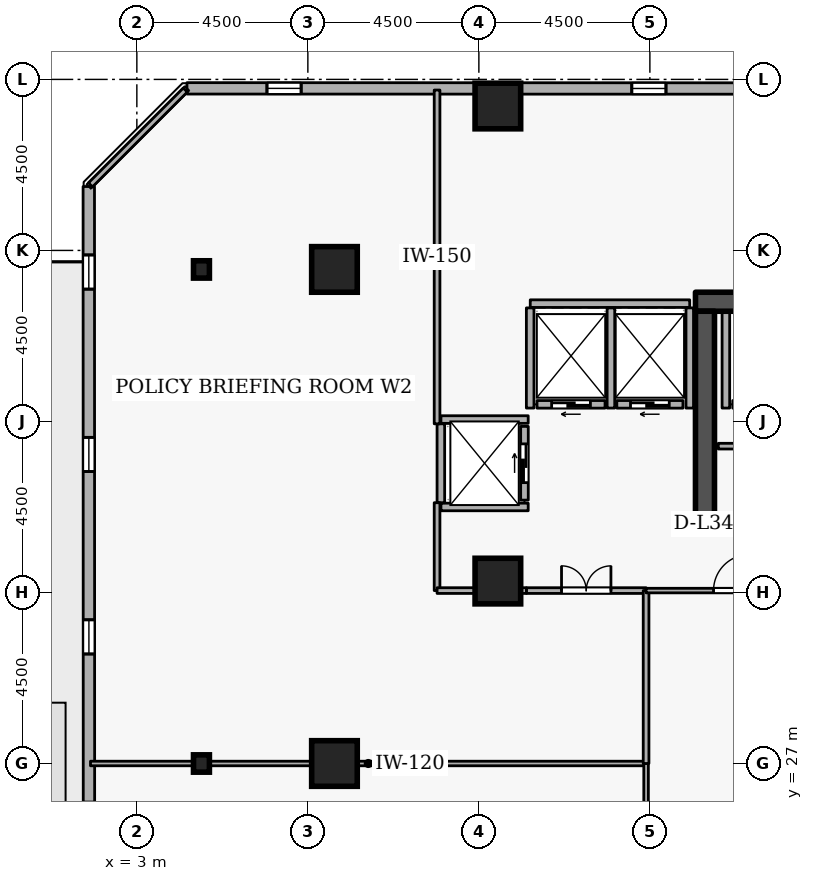
"""IFC4 building model, lengths in metres.
Left out: names, types, materials, properties, quantities, classifications, styles, units other than length and angle.
Written with IfcOpenShell. Run it as: python <this file> out.ifc"""

import sys

from ifc_helpers import new_model, si_unit, direction, frame, frame_2d, origin, origin_2d, place, context, subcontext, project, spatial, rectangle, i_section, extrude, element, fill, save


model = new_model("IFC4")
c1 = context("Model", 3, precision=1e-05, world=origin(), true_north=direction((0.0, 1.0)))
c2 = subcontext(c1, "Body", "Model", "MODEL_VIEW")
j1 = project(units=[si_unit("LENGTHUNIT", "METRE"), si_unit("PLANEANGLEUNIT", "RADIAN")], contexts=[c1])
p1 = place(None, origin())
s1 = spatial("IfcSite", under=j1, at=p1, CompositionType="ELEMENT")
p2 = place(p1, origin())
s2 = spatial("IfcBuilding", under=s1, at=p2, CompositionType="ELEMENT")
p3 = place(p2, frame((0.0, 0.0, 130.5)))
s3 = spatial("IfcBuildingStorey", under=s2, at=p3, CompositionType="ELEMENT", Elevation=130.5)
p4 = place(p3, frame((17.7, 39.15, 0.0), z_axis=(0.0, 0.0, 1.0), x_axis=(1.0, 0.0, 0.0)))
e1 = element("IfcWall", 1, at=p4, inside=s3, PredefinedType="SHEAR", context=c2, shape_type="SweptSolid", body=[
    extrude(rectangle(XDim=15.6, YDim=0.5, at=frame_2d((7.8, 0.0))), origin(), (0.0, 0.0, 1.0), 3.6),
])
p5 = place(p3, frame((17.95, 33.1, 0.0), z_axis=(0.0, 0.0, 1.0), x_axis=(0.0, 1.0, 0.0)))
e2 = element("IfcWall", 2, at=p5, inside=s3, PredefinedType="SHEAR", context=c2, shape_type="SweptSolid", body=[
    extrude(rectangle(XDim=5.8, YDim=0.5, at=frame_2d((2.9, 0.0))), origin(), (0.0, 0.0, 1.0), 3.6),
])
for number, where, z_axis, x_axis in (
    (3, (12.5, 44.3, 0.0), (0.0, 0.0, 1.0), (1.0, 0.0, 0.0)),
    (4, (8.2, 27.0, 0.0), (0.0, 0.0, 1.0), (1.0, 0.0, 0.0)),
    (5, (8.2, 40.0, 0.0), (0.0, 0.0, 1.0), (1.0, 0.0, 0.0)),
    (6, (12.5, 31.8, 0.0), (0.0, 0.0, 1.0), (1.0, 0.0, 0.0)),
):
    element("IfcColumn", number, at=place(p3, frame(where, z_axis=z_axis, x_axis=x_axis)), inside=s3, PredefinedType="COLUMN", context=c2, shape_type="SweptSolid", body=[
        extrude(rectangle(XDim=1.2, YDim=1.2, at=origin_2d()), origin(), (0.0, 0.0, 1.0), 3.6),
    ])
for number, where, z_axis, x_axis in (
    (7, (4.7, 27.0, 0.0), (0.0, 0.0, 1.0), (1.0, 0.0, 0.0)),
    (8, (4.7, 40.0, 0.0), (0.0, 0.0, 1.0), (1.0, 0.0, 0.0)),
):
    element("IfcColumn", number, at=place(p3, frame(where, z_axis=z_axis, x_axis=x_axis)), inside=s3, PredefinedType="COLUMN", context=c2, shape_type="SweptSolid", body=[
        extrude(i_section(OverallWidth=0.418, OverallDepth=0.456, WebThickness=0.042, FlangeThickness=0.067, FilletRadius=0.015, at=origin_2d()), origin(), (0.0, 0.0, 1.0), 3.6),
    ])
p6 = place(p3, frame((37.924, 44.756, 0.0), z_axis=(0.0, 0.0, 1.0), x_axis=(-0.999999963872, 0.000268805477, 0.0)))
e9 = element("IfcWall", 9, at=p6, inside=s3, PredefinedType="STANDARD", context=c2, shape_type="SweptSolid", body=[
    extrude(rectangle(XDim=33.605, YDim=0.3, at=frame_2d((16.802, 0.0))), origin(), (0.0, 0.0, 1.0), 2.7),
])
p7 = place(p6, frame((6.6, 0.0, 0.72)))
e10 = element("IfcOpeningElement", 10, at=p7, cuts=e9, PredefinedType="OPENING", context=c2, shape_type="SweptSolid", body=[
    extrude(rectangle(XDim=0.9, YDim=1.75, at=frame_2d((0.45, 0.875))), frame((0.0, 0.16, 0.0), z_axis=(0.0, -1.0, 0.0), x_axis=(1.0, 0.0, 0.0)), (0.0, 0.0, 1.0), 0.32),
])
p8 = place(p6, frame((16.2, 0.0, 0.72)))
e11 = element("IfcOpeningElement", 11, at=p8, cuts=e9, PredefinedType="OPENING", context=c2, shape_type="SweptSolid", body=[
    extrude(rectangle(XDim=0.9, YDim=1.75, at=frame_2d((0.45, 0.875))), frame((0.0, 0.16, 0.0), z_axis=(0.0, -1.0, 0.0), x_axis=(1.0, 0.0, 0.0)), (0.0, 0.0, 1.0), 0.32),
])
p9 = place(p6, frame((21.0, 0.0, 0.72)))
e12 = element("IfcOpeningElement", 12, at=p9, cuts=e9, PredefinedType="OPENING", context=c2, shape_type="SweptSolid", body=[
    extrude(rectangle(XDim=0.9, YDim=1.75, at=frame_2d((0.45, 0.875))), frame((0.0, 0.16, 0.0), z_axis=(0.0, -1.0, 0.0), x_axis=(1.0, 0.0, 0.0)), (0.0, 0.0, 1.0), 0.32),
])
p10 = place(p6, frame((30.6, 0.0, 0.72)))
e13 = element("IfcOpeningElement", 13, at=p10, cuts=e9, PredefinedType="OPENING", context=c2, shape_type="SweptSolid", body=[
    extrude(rectangle(XDim=0.9, YDim=1.75, at=frame_2d((0.45, 0.875))), frame((0.0, 0.16, 0.0), z_axis=(0.0, -1.0, 0.0), x_axis=(1.0, 0.0, 0.0)), (0.0, 0.0, 1.0), 0.32),
])
p11 = place(p3, frame((1.735, 42.181, 0.0), z_axis=(0.0, 0.0, 1.0), x_axis=(0.000268805477, -0.999999963872, 0.0)))
e14 = element("IfcWall", 14, at=p11, inside=s3, PredefinedType="STANDARD", context=c2, shape_type="SweptSolid", body=[
    extrude(rectangle(XDim=33.605, YDim=0.3, at=frame_2d((16.802, 0.0))), origin(), (0.0, 0.0, 1.0), 2.7),
])
p12 = place(p11, frame((18.603, 0.0, 0.0)))
e15 = element("IfcOpeningElement", 15, at=p12, cuts=e14, PredefinedType="OPENING", context=c2, shape_type="SweptSolid", body=[
    extrude(rectangle(XDim=1.0, YDim=2.08, at=frame_2d((0.5, 1.04))), frame((0.0, 0.16, 0.0), z_axis=(0.0, -1.0, 0.0), x_axis=(1.0, 0.0, 0.0)), (0.0, 0.0, 1.0), 0.32),
])
p13 = place(p11, frame((1.8, 0.0, 0.72)))
e16 = element("IfcOpeningElement", 16, at=p13, cuts=e14, PredefinedType="OPENING", context=c2, shape_type="SweptSolid", body=[
    extrude(rectangle(XDim=0.9, YDim=1.75, at=frame_2d((0.45, 0.875))), frame((0.0, 0.16, 0.0), z_axis=(0.0, -1.0, 0.0), x_axis=(1.0, 0.0, 0.0)), (0.0, 0.0, 1.0), 0.32),
])
p14 = place(p11, frame((6.6, 0.0, 0.72)))
e17 = element("IfcOpeningElement", 17, at=p14, cuts=e14, PredefinedType="OPENING", context=c2, shape_type="SweptSolid", body=[
    extrude(rectangle(XDim=0.9, YDim=1.75, at=frame_2d((0.45, 0.875))), frame((0.0, 0.16, 0.0), z_axis=(0.0, -1.0, 0.0), x_axis=(1.0, 0.0, 0.0)), (0.0, 0.0, 1.0), 0.32),
])
p15 = place(p11, frame((11.4, 0.0, 0.72)))
e18 = element("IfcOpeningElement", 18, at=p15, cuts=e14, PredefinedType="OPENING", context=c2, shape_type="SweptSolid", body=[
    extrude(rectangle(XDim=0.9, YDim=1.75, at=frame_2d((0.45, 0.875))), frame((0.0, 0.16, 0.0), z_axis=(0.0, -1.0, 0.0), x_axis=(1.0, 0.0, 0.0)), (0.0, 0.0, 1.0), 0.32),
])
p16 = place(p11, frame((16.2, 0.0, 0.72)))
e19 = element("IfcOpeningElement", 19, at=p16, cuts=e14, PredefinedType="OPENING", context=c2, shape_type="SweptSolid", body=[
    extrude(rectangle(XDim=0.9, YDim=1.75, at=frame_2d((0.45, 0.875))), frame((0.0, 0.16, 0.0), z_axis=(0.0, -1.0, 0.0), x_axis=(1.0, 0.0, 0.0)), (0.0, 0.0, 1.0), 0.32),
])
p17 = place(p11, frame((21.0, 0.0, 0.72)))
e20 = element("IfcOpeningElement", 20, at=p17, cuts=e14, PredefinedType="OPENING", context=c2, shape_type="SweptSolid", body=[
    extrude(rectangle(XDim=0.9, YDim=1.75, at=frame_2d((0.45, 0.875))), frame((0.0, 0.16, 0.0), z_axis=(0.0, -1.0, 0.0), x_axis=(1.0, 0.0, 0.0)), (0.0, 0.0, 1.0), 0.32),
])
p18 = place(p11, frame((25.8, 0.0, 0.72)))
e21 = element("IfcOpeningElement", 21, at=p18, cuts=e14, PredefinedType="OPENING", context=c2, shape_type="SweptSolid", body=[
    extrude(rectangle(XDim=0.9, YDim=1.75, at=frame_2d((0.45, 0.875))), frame((0.0, 0.16, 0.0), z_axis=(0.0, -1.0, 0.0), x_axis=(1.0, 0.0, 0.0)), (0.0, 0.0, 1.0), 0.32),
])
p19 = place(p11, frame((30.6, 0.0, 0.72)))
e22 = element("IfcOpeningElement", 22, at=p19, cuts=e14, PredefinedType="OPENING", context=c2, shape_type="SweptSolid", body=[
    extrude(rectangle(XDim=0.9, YDim=1.75, at=frame_2d((0.45, 0.875))), frame((0.0, 0.16, 0.0), z_axis=(0.0, -1.0, 0.0), x_axis=(1.0, 0.0, 0.0)), (0.0, 0.0, 1.0), 0.32),
])
p20 = place(p3, frame((20.62, 36.45, 0.0), z_axis=(0.0, 0.0, 1.0), x_axis=(-1.0, 0.0, 0.0)))
e23 = element("IfcWall", 23, at=p20, inside=s3, PredefinedType="STANDARD", context=c2, shape_type="SweptSolid", body=[
    extrude(rectangle(XDim=1.94, YDim=0.2, at=frame_2d((0.97, 0.0))), origin(), (0.0, 0.0, 1.0), 3.34),
])
p21 = place(p3, frame((17.37, 36.45, 0.0), z_axis=(0.0, 0.0, 1.0), x_axis=(-1.0, 0.0, 0.0)))
e24 = element("IfcWall", 24, at=p21, inside=s3, PredefinedType="STANDARD", context=c2, shape_type="SweptSolid", body=[
    extrude(rectangle(XDim=1.74, YDim=0.2, at=frame_2d((0.87, 0.0))), origin(), (0.0, 0.0, 1.0), 3.34),
])
p22 = place(p21, frame((0.36, 0.0, 0.0)))
e25 = element("IfcOpeningElement", 25, at=p22, cuts=e24, PredefinedType="OPENING", context=c2, shape_type="SweptSolid", body=[
    extrude(rectangle(XDim=1.02, YDim=2.06, at=frame_2d((0.51, 1.03))), frame((0.0, 0.11, 0.0), z_axis=(0.0, -1.0, 0.0), x_axis=(1.0, 0.0, 0.0)), (0.0, 0.0, 1.0), 0.22),
])
p23 = place(p3, frame((15.32, 36.45, 0.0), z_axis=(0.0, 0.0, 1.0), x_axis=(-1.0, 0.0, 0.0)))
e26 = element("IfcWall", 26, at=p23, inside=s3, PredefinedType="STANDARD", context=c2, shape_type="SweptSolid", body=[
    extrude(rectangle(XDim=1.79, YDim=0.2, at=frame_2d((0.895, 0.0))), origin(), (0.0, 0.0, 1.0), 3.34),
])
p24 = place(p23, frame((0.385, 0.0, 0.0)))
e27 = element("IfcOpeningElement", 27, at=p24, cuts=e26, PredefinedType="OPENING", context=c2, shape_type="SweptSolid", body=[
    extrude(rectangle(XDim=1.02, YDim=2.06, at=frame_2d((0.51, 1.03))), frame((0.0, 0.11, 0.0), z_axis=(0.0, -1.0, 0.0), x_axis=(1.0, 0.0, 0.0)), (0.0, 0.0, 1.0), 0.22),
])
p25 = place(p3, frame((13.2, 33.93, 0.0), z_axis=(0.0, 0.0, 1.0), x_axis=(0.0, 1.0, 0.0)))
e28 = element("IfcWall", 28, at=p25, inside=s3, PredefinedType="STANDARD", context=c2, shape_type="SweptSolid", body=[
    extrude(rectangle(XDim=1.94, YDim=0.2, at=frame_2d((0.97, 0.0))), origin(), (0.0, 0.0, 1.0), 3.34),
])
p26 = place(p25, frame((0.46, 0.0, 0.0)))
e29 = element("IfcOpeningElement", 29, at=p26, cuts=e28, PredefinedType="OPENING", context=c2, shape_type="SweptSolid", body=[
    extrude(rectangle(XDim=1.02, YDim=2.06, at=frame_2d((0.51, 1.03))), frame((0.0, 0.11, 0.0), z_axis=(0.0, -1.0, 0.0), x_axis=(1.0, 0.0, 0.0)), (0.0, 0.0, 1.0), 0.22),
])
p27 = place(p3, frame((18.5, 36.352, 0.0), z_axis=(0.0, 0.0, 1.0), x_axis=(0.0, 1.0, 0.0)))
e30 = element("IfcWall", 30, at=p27, inside=s3, PredefinedType="STANDARD", context=c2, shape_type="SweptSolid", body=[
    extrude(rectangle(XDim=2.536, YDim=0.2, at=frame_2d((1.268, 0.0))), origin(), (0.0, 0.0, 1.0), 3.34),
])
p28 = place(p3, frame((13.352, 39.1, 0.0), z_axis=(0.0, 0.0, 1.0), x_axis=(1.0, 0.0, 0.0)))
e31 = element("IfcWall", 31, at=p28, inside=s3, PredefinedType="STANDARD", context=c2, shape_type="SweptSolid", body=[
    extrude(rectangle(XDim=4.196, YDim=0.2, at=frame_2d((2.098, 0.0))), origin(), (0.0, 0.0, 1.0), 3.34),
])
p29 = place(p3, frame((17.55, 36.352, 0.0), z_axis=(0.0, 0.0, 1.0), x_axis=(0.0, 1.0, 0.0)))
e32 = element("IfcWall", 32, at=p29, inside=s3, PredefinedType="STANDARD", context=c2, shape_type="SweptSolid", body=[
    extrude(rectangle(XDim=2.636, YDim=0.2, at=frame_2d((1.318, 0.0))), origin(), (0.0, 0.0, 1.0), 2.545),
])
for number, where, z_axis, x_axis in (
    (33, (15.475, 36.352, 0.0), (0.0, 0.0, 1.0), (0.0, 1.0, 0.0)),
    (34, (13.35, 36.352, 0.0), (0.0, 0.0, 1.0), (0.0, 1.0, 0.0)),
):
    element("IfcWall", number, at=place(p3, frame(where, z_axis=z_axis, x_axis=x_axis)), inside=s3, PredefinedType="STANDARD", context=c2, shape_type="SweptSolid", body=[
        extrude(rectangle(XDim=2.636, YDim=0.2, at=frame_2d((1.318, 0.0))), origin(), (0.0, 0.0, 1.0), 3.34),
    ])
for number, where, z_axis, x_axis in (
    (35, (11.002, 36.05, 0.0), (0.0, 0.0, 1.0), (1.0, 0.0, 0.0)),
    (36, (11.002, 33.75, 0.0), (0.0, 0.0, 1.0), (1.0, 0.0, 0.0)),
):
    element("IfcWall", number, at=place(p3, frame(where, z_axis=z_axis, x_axis=x_axis)), inside=s3, PredefinedType="STANDARD", context=c2, shape_type="SweptSolid", body=[
        extrude(rectangle(XDim=2.296, YDim=0.2, at=frame_2d((1.148, 0.0))), origin(), (0.0, 0.0, 1.0), 3.34),
    ])
p30 = place(p3, frame((11.0, 33.862, 0.0), z_axis=(0.0, 0.0, 1.0), x_axis=(0.0, 1.0, 0.0)))
e37 = element("IfcWall", 37, at=p30, inside=s3, PredefinedType="STANDARD", context=c2, shape_type="SweptSolid", body=[
    extrude(rectangle(XDim=2.076, YDim=0.2, at=frame_2d((1.038, 0.0))), origin(), (0.0, 0.0, 1.0), 3.34),
])
p31 = place(p3, frame((18.3, 33.3, 0.0), z_axis=(0.0, 0.0, 1.0), x_axis=(1.0, 0.0, 0.0)))
e38 = element("IfcWall", 38, at=p31, inside=s3, PredefinedType="PARTITIONING", context=c2, shape_type="SweptSolid", body=[
    extrude(rectangle(XDim=3.3, YDim=0.15, at=frame_2d((1.65, 0.0))), origin(), (0.0, 0.0, 1.0), 3.34),
])
p32 = place(p31, frame((1.19, 0.0, 0.0)))
e39 = element("IfcOpeningElement", 39, at=p32, cuts=e38, PredefinedType="OPENING", context=c2, shape_type="SweptSolid", body=[
    extrude(rectangle(XDim=0.92, YDim=2.08, at=frame_2d((0.46, 1.04))), frame((0.0, 0.085, 0.0), z_axis=(0.0, -1.0, 0.0), x_axis=(1.0, 0.0, 0.0)), (0.0, 0.0, 1.0), 0.17),
])
p33 = place(p3, frame((21.6, 35.35, 0.0), z_axis=(0.0, 0.0, 1.0), x_axis=(-1.0, 0.0, 0.0)))
e40 = element("IfcWall", 40, at=p33, inside=s3, PredefinedType="PARTITIONING", context=c2, shape_type="SweptSolid", body=[
    extrude(rectangle(XDim=3.3, YDim=0.15, at=frame_2d((1.65, 0.0))), origin(), (0.0, 0.0, 1.0), 3.34),
])
p34 = place(p3, frame((1.78, 27.0, 0.0), z_axis=(0.0, 0.0, 1.0), x_axis=(1.0, 0.0, 0.0)))
e41 = element("IfcWall", 41, at=p34, inside=s3, PredefinedType="PARTITIONING", context=c2, shape_type="SweptSolid", body=[
    extrude(rectangle(XDim=14.62, YDim=0.12, at=frame_2d((7.31, 0.0))), origin(), (0.0, 0.0, 1.0), 2.878),
])
p35 = place(p3, frame((16.4, 27.0, 0.0), z_axis=(0.0, 0.0, 1.0), x_axis=(0.0, -1.0, 0.0)))
e42 = element("IfcWall", 42, at=p35, inside=s3, PredefinedType="PARTITIONING", context=c2, shape_type="SweptSolid", body=[
    extrude(rectangle(XDim=4.55, YDim=0.12, at=frame_2d((2.275, 0.0))), origin(), (0.0, 0.0, 1.0), 3.34),
])
p36 = place(p3, frame((13.25, 31.55, 0.0), z_axis=(0.0, 0.0, 1.0), x_axis=(1.0, 0.0, 0.0)))
e43 = element("IfcWall", 43, at=p36, inside=s3, PredefinedType="PARTITIONING", context=c2, shape_type="SweptSolid", body=[
    extrude(rectangle(XDim=3.15, YDim=0.15, at=frame_2d((1.575, 0.0))), origin(), (0.0, 0.0, 1.0), 3.34),
])
p37 = place(p36, frame((0.925, 0.0, 0.0)))
e44 = element("IfcOpeningElement", 44, at=p37, cuts=e43, PredefinedType="OPENING", context=c2, shape_type="SweptSolid", body=[
    extrude(rectangle(XDim=1.3, YDim=2.12, at=frame_2d((0.65, 1.06))), frame((0.0, 0.085, 0.0), z_axis=(0.0, -1.0, 0.0), x_axis=(1.0, 0.0, 0.0)), (0.0, 0.0, 1.0), 0.17),
])
p38 = place(p3, frame((16.4, 31.55, 0.0), z_axis=(0.0, 0.0, 1.0), x_axis=(0.0, -1.0, 0.0)))
e45 = element("IfcWall", 45, at=p38, inside=s3, PredefinedType="PARTITIONING", context=c2, shape_type="SweptSolid", body=[
    extrude(rectangle(XDim=4.55, YDim=0.15, at=frame_2d((2.275, 0.0))), origin(), (0.0, 0.0, 1.0), 3.34),
])
p39 = place(p3, frame((1.78, 42.225, 0.0), z_axis=(0.0, 0.0, 1.0), x_axis=(0.707106781187, 0.707106781187, 0.0)))
e46 = element("IfcWall", 46, at=p39, inside=s3, PredefinedType="PARTITIONING", context=c2, shape_type="SweptSolid", body=[
    extrude(rectangle(XDim=3.528, YDim=0.15, at=frame_2d((1.764, 0.0))), origin(), (0.0, 0.0, 1.0), 3.34),
])
p40 = place(p3, frame((10.9, 44.72, 0.0), z_axis=(0.0, 0.0, 1.0), x_axis=(0.0, -1.0, 0.0)))
e47 = element("IfcWall", 47, at=p40, inside=s3, PredefinedType="PARTITIONING", context=c2, shape_type="SweptSolid", body=[
    extrude(rectangle(XDim=8.782, YDim=0.15, at=frame_2d((4.391, 0.0))), origin(), (0.0, 0.0, 1.0), 3.34),
])
p41 = place(p3, frame((10.9, 33.862, 0.0), z_axis=(0.0, 0.0, 1.0), x_axis=(0.0, -1.0, 0.0)))
e48 = element("IfcWall", 48, at=p41, inside=s3, PredefinedType="PARTITIONING", context=c2, shape_type="SweptSolid", body=[
    extrude(rectangle(XDim=2.312, YDim=0.15, at=frame_2d((1.156, 0.0))), origin(), (0.0, 0.0, 1.0), 3.34),
])
p42 = place(p3, frame((10.9, 31.55, 0.0), z_axis=(0.0, 0.0, 1.0), x_axis=(1.0, 0.0, 0.0)))
e49 = element("IfcWall", 49, at=p42, inside=s3, PredefinedType="PARTITIONING", context=c2, shape_type="SweptSolid", body=[
    extrude(rectangle(XDim=2.35, YDim=0.15, at=frame_2d((1.175, 0.0))), origin(), (0.0, 0.0, 1.0), 3.34),
])
p43 = place(p3, frame((16.4, 31.55, 0.0), z_axis=(0.0, 0.0, 1.0), x_axis=(1.0, 0.0, 0.0)))
e50 = element("IfcWall", 50, at=p43, inside=s3, PredefinedType="PARTITIONING", context=c2, shape_type="SweptSolid", body=[
    extrude(rectangle(XDim=4.5, YDim=0.12, at=frame_2d((2.25, 0.0))), origin(), (0.0, 0.0, 1.0), 3.34),
])
p44 = place(p43, frame((1.775, 0.0, 0.0)))
e51 = element("IfcOpeningElement", 51, at=p44, cuts=e50, PredefinedType="OPENING", context=c2, shape_type="SweptSolid", body=[
    extrude(rectangle(XDim=0.95, YDim=2.1, at=frame_2d((0.475, 1.05))), frame((0.0, 0.07, 0.0), z_axis=(0.0, -1.0, 0.0), x_axis=(1.0, 0.0, 0.0)), (0.0, 0.0, 1.0), 0.14),
])
p45 = place(p9, origin())
e52 = element("IfcWindow", 52, at=p45, inside=s3, PartitioningType="SINGLE_PANEL", PredefinedType="WINDOW", context=c2, shape_type="SweptSolid", body=[
    extrude(rectangle(XDim=0.9, YDim=1.75, at=frame_2d((0.45, 0.875))), frame((0.0, 0.03, 0.0), z_axis=(0.0, -1.0, 0.0), x_axis=(1.0, 0.0, 0.0)), (0.0, 0.0, 1.0), 0.06),
])
fill(e12, e52)
p46 = place(p10, origin())
e53 = element("IfcWindow", 53, at=p46, inside=s3, PartitioningType="SINGLE_PANEL", PredefinedType="WINDOW", context=c2, shape_type="SweptSolid", body=[
    extrude(rectangle(XDim=0.9, YDim=1.75, at=frame_2d((0.45, 0.875))), frame((0.0, 0.03, 0.0), z_axis=(0.0, -1.0, 0.0), x_axis=(1.0, 0.0, 0.0)), (0.0, 0.0, 1.0), 0.06),
])
fill(e13, e53)
p47 = place(p13, origin())
e54 = element("IfcWindow", 54, at=p47, inside=s3, PartitioningType="SINGLE_PANEL", PredefinedType="WINDOW", context=c2, shape_type="SweptSolid", body=[
    extrude(rectangle(XDim=0.9, YDim=1.75, at=frame_2d((0.45, 0.875))), frame((0.0, 0.03, 0.0), z_axis=(0.0, -1.0, 0.0), x_axis=(1.0, 0.0, 0.0)), (0.0, 0.0, 1.0), 0.06),
])
fill(e16, e54)
p48 = place(p14, origin())
e55 = element("IfcWindow", 55, at=p48, inside=s3, PartitioningType="SINGLE_PANEL", PredefinedType="WINDOW", context=c2, shape_type="SweptSolid", body=[
    extrude(rectangle(XDim=0.9, YDim=1.75, at=frame_2d((0.45, 0.875))), frame((0.0, 0.03, 0.0), z_axis=(0.0, -1.0, 0.0), x_axis=(1.0, 0.0, 0.0)), (0.0, 0.0, 1.0), 0.06),
])
fill(e17, e55)
p49 = place(p15, origin())
e56 = element("IfcWindow", 56, at=p49, inside=s3, PartitioningType="SINGLE_PANEL", PredefinedType="WINDOW", context=c2, shape_type="SweptSolid", body=[
    extrude(rectangle(XDim=0.9, YDim=1.75, at=frame_2d((0.45, 0.875))), frame((0.0, 0.03, 0.0), z_axis=(0.0, -1.0, 0.0), x_axis=(1.0, 0.0, 0.0)), (0.0, 0.0, 1.0), 0.06),
])
fill(e18, e56)
p50 = place(p22, origin())
e57 = element("IfcDoor", 57, at=p50, inside=s3, OperationType="SLIDING_TO_LEFT", PredefinedType="DOOR", context=c2, shape_type="SweptSolid", body=[
    extrude(rectangle(XDim=1.02, YDim=2.06, at=frame_2d((0.51, 1.03))), frame((0.0, 0.025, 0.0), z_axis=(0.0, -1.0, 0.0), x_axis=(1.0, 0.0, 0.0)), (0.0, 0.0, 1.0), 0.05),
])
fill(e25, e57)
p51 = place(p24, origin())
e58 = element("IfcDoor", 58, at=p51, inside=s3, OperationType="SLIDING_TO_LEFT", PredefinedType="DOOR", context=c2, shape_type="SweptSolid", body=[
    extrude(rectangle(XDim=1.02, YDim=2.06, at=frame_2d((0.51, 1.03))), frame((0.0, 0.025, 0.0), z_axis=(0.0, -1.0, 0.0), x_axis=(1.0, 0.0, 0.0)), (0.0, 0.0, 1.0), 0.05),
])
fill(e27, e58)
p52 = place(p26, origin())
e59 = element("IfcDoor", 59, at=p52, inside=s3, OperationType="SLIDING_TO_LEFT", PredefinedType="DOOR", context=c2, shape_type="SweptSolid", body=[
    extrude(rectangle(XDim=1.02, YDim=2.06, at=frame_2d((0.51, 1.03))), frame((0.0, 0.025, 0.0), z_axis=(0.0, -1.0, 0.0), x_axis=(1.0, 0.0, 0.0)), (0.0, 0.0, 1.0), 0.05),
])
fill(e29, e59)
p53 = place(p37, origin())
e60 = element("IfcDoor", 60, at=p53, inside=s3, OperationType="DOUBLE_DOOR_SINGLE_SWING", PredefinedType="DOOR", context=c2, shape_type="SweptSolid", body=[
    extrude(rectangle(XDim=1.3, YDim=2.12, at=frame_2d((0.65, 1.06))), frame((0.0, 0.025, 0.0), z_axis=(0.0, -1.0, 0.0), x_axis=(1.0, 0.0, 0.0)), (0.0, 0.0, 1.0), 0.05),
])
fill(e44, e60)
p54 = place(p44, origin())
e61 = element("IfcDoor", 61, at=p54, inside=s3, OperationType="SINGLE_SWING_RIGHT", PredefinedType="DOOR", context=c2, shape_type="SweptSolid", body=[
    extrude(rectangle(XDim=0.95, YDim=2.1, at=frame_2d((0.475, 1.05))), frame((0.0, 0.025, 0.0), z_axis=(0.0, -1.0, 0.0), x_axis=(1.0, 0.0, 0.0)), (0.0, 0.0, 1.0), 0.05),
])
fill(e51, e61)
save(model, sys.argv[1])
